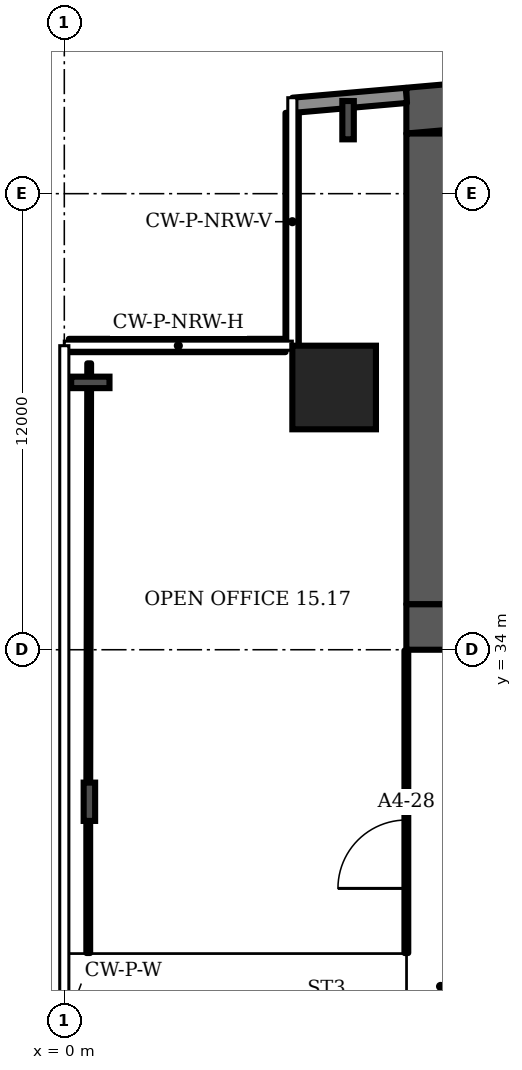
"""IFC4 building model, lengths in metres.
Left out: names, types, materials, properties, quantities, classifications, styles, units other than length and angle.
Written with IfcOpenShell. Run it as: python <this file> out.ifc"""

import sys

from ifc_helpers import new_model, si_unit, direction, frame, frame_2d, origin, origin_2d, place, context, subcontext, project, spatial, polyline, rectangle, i_section, outline, extrude, element, fill, save


model = new_model("IFC4")
c1 = context("Model", 3, precision=1e-05, world=origin(), true_north=direction((0.0, 1.0)))
c2 = subcontext(c1, "Body", "Model", "MODEL_VIEW")
j1 = project(units=[si_unit("LENGTHUNIT", "METRE"), si_unit("PLANEANGLEUNIT", "RADIAN")], contexts=[c1])
p1 = place(None, origin())
s1 = spatial("IfcSite", under=j1, at=p1, CompositionType="ELEMENT")
p2 = place(p1, origin())
s2 = spatial("IfcBuilding", under=s1, at=p2, CompositionType="ELEMENT")
p3 = place(p2, frame((0.0, 0.0, 73.9)))
s3 = spatial("IfcBuildingStorey", under=s2, at=p3, CompositionType="ELEMENT", Elevation=73.9)
p4 = place(p3, origin())
e1 = element("IfcWall", 1, at=p4, inside=s3, PredefinedType="SHEAR", context=c2, shape_type="SweptSolid", body=[
    extrude(outline(polyline([(9.0, 47.583), (37.0, 50.032), (65.0, 47.583), (65.0, 48.787), (37.0, 51.237), (9.0, 48.787), (9.0, 47.583)])), origin(), (0.0, 0.0, 1.0), 3.6),
])
p5 = place(p3, frame((9.0, 34.6, 0.0), z_axis=(0.0, 0.0, 1.0), x_axis=(1.0, 0.0, 0.0)))
e2 = element("IfcWall", 2, at=p5, inside=s3, PredefinedType="SHEAR", context=c2, shape_type="SweptSolid", body=[
    extrude(rectangle(XDim=56.0, YDim=1.2, at=frame_2d((28.0, 0.0))), origin(), (0.0, 0.0, 1.0), 3.6),
])
p6 = place(p5, frame((2.0, 0.0, 0.0)))
e3 = element("IfcOpeningElement", 3, at=p6, cuts=e2, PredefinedType="OPENING", context=c2, shape_type="SweptSolid", body=[
    extrude(rectangle(XDim=1.0, YDim=2.1, at=frame_2d((0.5, 1.05))), frame((0.0, 0.61, 0.0), z_axis=(0.0, -1.0, 0.0), x_axis=(1.0, 0.0, 0.0)), (0.0, 0.0, 1.0), 1.22),
])
p7 = place(p5, frame((4.6, 0.0, 0.0)))
e4 = element("IfcOpeningElement", 4, at=p7, cuts=e2, PredefinedType="OPENING", context=c2, shape_type="SweptSolid", body=[
    extrude(rectangle(XDim=1.0, YDim=2.1, at=frame_2d((0.5, 1.05))), frame((0.0, 0.61, 0.0), z_axis=(0.0, -1.0, 0.0), x_axis=(1.0, 0.0, 0.0)), (0.0, 0.0, 1.0), 1.22),
])
p8 = place(p5, frame((7.867, 0.0, 0.0)))
e5 = element("IfcOpeningElement", 5, at=p8, cuts=e2, PredefinedType="OPENING", context=c2, shape_type="SweptSolid", body=[
    extrude(rectangle(XDim=1.1, YDim=2.1, at=frame_2d((0.55, 1.05))), frame((0.0, 0.61, 0.0), z_axis=(0.0, -1.0, 0.0), x_axis=(1.0, 0.0, 0.0)), (0.0, 0.0, 1.0), 1.22),
])
p9 = place(p5, frame((12.033, 0.0, 0.0)))
e6 = element("IfcOpeningElement", 6, at=p9, cuts=e2, PredefinedType="OPENING", context=c2, shape_type="SweptSolid", body=[
    extrude(rectangle(XDim=1.1, YDim=2.1, at=frame_2d((0.55, 1.05))), frame((0.0, 0.61, 0.0), z_axis=(0.0, -1.0, 0.0), x_axis=(1.0, 0.0, 0.0)), (0.0, 0.0, 1.0), 1.22),
])
p10 = place(p5, frame((9.8, 0.0, 0.0)))
e7 = element("IfcOpeningElement", 7, at=p10, cuts=e2, PredefinedType="OPENING", context=c2, shape_type="SweptSolid", body=[
    extrude(rectangle(XDim=1.4, YDim=2.1, at=frame_2d((0.7, 1.05))), frame((0.0, 0.61, 0.0), z_axis=(0.0, -1.0, 0.0), x_axis=(1.0, 0.0, 0.0)), (0.0, 0.0, 1.0), 1.22),
])
p11 = place(p5, frame((14.65, 0.0, 0.0)))
e8 = element("IfcOpeningElement", 8, at=p11, cuts=e2, PredefinedType="OPENING", context=c2, shape_type="SweptSolid", body=[
    extrude(rectangle(XDim=1.2, YDim=2.1, at=frame_2d((0.6, 1.05))), frame((0.0, 0.61, 0.0), z_axis=(0.0, -1.0, 0.0), x_axis=(1.0, 0.0, 0.0)), (0.0, 0.0, 1.0), 1.22),
])
p12 = place(p5, frame((21.867, 0.0, 0.0)))
e9 = element("IfcOpeningElement", 9, at=p12, cuts=e2, PredefinedType="OPENING", context=c2, shape_type="SweptSolid", body=[
    extrude(rectangle(XDim=1.1, YDim=2.1, at=frame_2d((0.55, 1.05))), frame((0.0, 0.61, 0.0), z_axis=(0.0, -1.0, 0.0), x_axis=(1.0, 0.0, 0.0)), (0.0, 0.0, 1.0), 1.22),
])
p13 = place(p5, frame((26.033, 0.0, 0.0)))
e10 = element("IfcOpeningElement", 10, at=p13, cuts=e2, PredefinedType="OPENING", context=c2, shape_type="SweptSolid", body=[
    extrude(rectangle(XDim=1.1, YDim=2.1, at=frame_2d((0.55, 1.05))), frame((0.0, 0.61, 0.0), z_axis=(0.0, -1.0, 0.0), x_axis=(1.0, 0.0, 0.0)), (0.0, 0.0, 1.0), 1.22),
])
p14 = place(p5, frame((23.8, 0.0, 0.0)))
e11 = element("IfcOpeningElement", 11, at=p14, cuts=e2, PredefinedType="OPENING", context=c2, shape_type="SweptSolid", body=[
    extrude(rectangle(XDim=1.4, YDim=2.1, at=frame_2d((0.7, 1.05))), frame((0.0, 0.61, 0.0), z_axis=(0.0, -1.0, 0.0), x_axis=(1.0, 0.0, 0.0)), (0.0, 0.0, 1.0), 1.22),
])
p15 = place(p5, frame((28.867, 0.0, 0.0)))
e12 = element("IfcOpeningElement", 12, at=p15, cuts=e2, PredefinedType="OPENING", context=c2, shape_type="SweptSolid", body=[
    extrude(rectangle(XDim=1.1, YDim=2.1, at=frame_2d((0.55, 1.05))), frame((0.0, 0.61, 0.0), z_axis=(0.0, -1.0, 0.0), x_axis=(1.0, 0.0, 0.0)), (0.0, 0.0, 1.0), 1.22),
])
p16 = place(p5, frame((33.033, 0.0, 0.0)))
e13 = element("IfcOpeningElement", 13, at=p16, cuts=e2, PredefinedType="OPENING", context=c2, shape_type="SweptSolid", body=[
    extrude(rectangle(XDim=1.1, YDim=2.1, at=frame_2d((0.55, 1.05))), frame((0.0, 0.61, 0.0), z_axis=(0.0, -1.0, 0.0), x_axis=(1.0, 0.0, 0.0)), (0.0, 0.0, 1.0), 1.22),
])
p17 = place(p5, frame((40.15, 0.0, 0.0)))
e14 = element("IfcOpeningElement", 14, at=p17, cuts=e2, PredefinedType="OPENING", context=c2, shape_type="SweptSolid", body=[
    extrude(rectangle(XDim=1.2, YDim=2.1, at=frame_2d((0.6, 1.05))), frame((0.0, 0.61, 0.0), z_axis=(0.0, -1.0, 0.0), x_axis=(1.0, 0.0, 0.0)), (0.0, 0.0, 1.0), 1.22),
])
p18 = place(p5, frame((44.8, 0.0, 0.0)))
e15 = element("IfcOpeningElement", 15, at=p18, cuts=e2, PredefinedType="OPENING", context=c2, shape_type="SweptSolid", body=[
    extrude(rectangle(XDim=1.4, YDim=2.1, at=frame_2d((0.7, 1.05))), frame((0.0, 0.61, 0.0), z_axis=(0.0, -1.0, 0.0), x_axis=(1.0, 0.0, 0.0)), (0.0, 0.0, 1.0), 1.22),
])
p19 = place(p5, frame((49.867, 0.0, 0.0)))
e16 = element("IfcOpeningElement", 16, at=p19, cuts=e2, PredefinedType="OPENING", context=c2, shape_type="SweptSolid", body=[
    extrude(rectangle(XDim=1.1, YDim=2.1, at=frame_2d((0.55, 1.05))), frame((0.0, 0.61, 0.0), z_axis=(0.0, -1.0, 0.0), x_axis=(1.0, 0.0, 0.0)), (0.0, 0.0, 1.0), 1.22),
])
p20 = place(p5, frame((53.5, 0.0, 0.0)))
e17 = element("IfcOpeningElement", 17, at=p20, cuts=e2, PredefinedType="OPENING", context=c2, shape_type="SweptSolid", body=[
    extrude(rectangle(XDim=1.1, YDim=2.1, at=frame_2d((0.55, 1.05))), frame((0.0, 0.61, 0.0), z_axis=(0.0, -1.0, 0.0), x_axis=(1.0, 0.0, 0.0)), (0.0, 0.0, 1.0), 1.22),
])
p21 = place(p5, frame((51.567, 0.0, 0.0)))
e18 = element("IfcOpeningElement", 18, at=p21, cuts=e2, PredefinedType="OPENING", context=c2, shape_type="SweptSolid", body=[
    extrude(rectangle(XDim=1.4, YDim=2.1, at=frame_2d((0.7, 1.05))), frame((0.0, 0.61, 0.0), z_axis=(0.0, -1.0, 0.0), x_axis=(1.0, 0.0, 0.0)), (0.0, 0.0, 1.0), 1.22),
])
p22 = place(p3, frame((9.6, 35.2, 0.0), z_axis=(0.0, 0.0, 1.0), x_axis=(0.0, 1.0, 0.0)))
e19 = element("IfcWall", 19, at=p22, inside=s3, PredefinedType="SHEAR", context=c2, shape_type="SweptSolid", body=[
    extrude(rectangle(XDim=12.383, YDim=1.2, at=frame_2d((6.191, 0.0))), origin(), (0.0, 0.0, 1.0), 3.6),
])
p23 = place(p3, frame((7.1, 40.9, 0.0), z_axis=(0.0, 0.0, 1.0), x_axis=(1.0, 0.0, 0.0)))
e20 = element("IfcColumn", 20, at=p23, inside=s3, PredefinedType="COLUMN", context=c2, shape_type="SweptSolid", body=[
    extrude(rectangle(XDim=2.2, YDim=2.2, at=origin_2d()), origin(), (0.0, 0.0, 1.0), 3.6),
])
for number, where, z_axis, x_axis in (
    (21, (7.467, 47.934, 0.0), (0.0, 0.0, 1.0), (-1.0, 0.0, 0.0)),
    (22, (0.685, 41.034, 0.0), (0.0, 0.0, 1.0), (0.0, 1.0, 0.0)),
    (23, (0.66, 30.0, 0.0), (0.0, 0.0, 1.0), (-1.0, 0.0, 0.0)),
):
    element("IfcColumn", number, at=place(p3, frame(where, z_axis=z_axis, x_axis=x_axis)), inside=s3, PredefinedType="COLUMN", context=c2, shape_type="SweptSolid", body=[
        extrude(i_section(OverallWidth=0.302, OverallDepth=1.008, WebThickness=0.021, FlangeThickness=0.04, FilletRadius=0.03, at=origin_2d()), origin(), (0.0, 0.0, 1.0), 3.6),
    ])
p24 = place(p3, frame((9.0, 48.587, 0.0), z_axis=(0.0, 0.0, 1.0), x_axis=(-0.996194, -0.087168, 0.0)))
e24 = element("IfcWall", 24, at=p24, inside=s3, PredefinedType="SOLIDWALL", context=c2, shape_type="SweptSolid", body=[
    extrude(rectangle(XDim=2.994, YDim=0.4, at=frame_2d((1.497, 0.0))), origin(), (0.0, 0.0, 1.0), 3.2),
])
p25 = place(p3, frame((5.995, 48.126, 0.0), z_axis=(0.0, 0.0, 1.0), x_axis=(0.0, -1.0, 0.0)))
e25 = element("IfcWall", 25, at=p25, inside=s3, PredefinedType="SOLIDWALL", context=c2, shape_type="SweptSolid", body=[
    extrude(rectangle(XDim=6.126, YDim=0.35, at=frame_2d((3.063, 0.0))), origin(), (0.0, 0.0, 1.0), 1.0),
])
p26 = place(p3, frame((5.82, 42.005, 0.0), z_axis=(0.0, 0.0, 1.0), x_axis=(-1.0, 0.0, 0.0)))
e26 = element("IfcWall", 26, at=p26, inside=s3, PredefinedType="SOLIDWALL", context=c2, shape_type="SweptSolid", body=[
    extrude(rectangle(XDim=5.7, YDim=0.35, at=frame_2d((2.85, 0.0))), origin(), (0.0, 0.0, 1.0), 1.0),
])
p27 = place(p3, frame((0.63, 26.02, 0.0), z_axis=(0.0, 0.0, 1.0), x_axis=(0.0, 1.0, 0.0)))
e27 = element("IfcWall", 27, at=p27, inside=s3, PredefinedType="PARTITIONING", context=c2, shape_type="SweptSolid", body=[
    extrude(rectangle(XDim=3.98, YDim=0.1, at=frame_2d((1.99, 0.0))), origin(), (0.0, 0.0, 1.0), 2.58),
])
p28 = place(p3, frame((0.63, 30.0, 0.0), z_axis=(0.0, 0.0, 1.0), x_axis=(0.00218, 0.999994, 0.0)))
e28 = element("IfcWall", 28, at=p28, inside=s3, PredefinedType="PARTITIONING", context=c2, shape_type="SweptSolid", body=[
    extrude(rectangle(XDim=11.535, YDim=0.1, at=frame_2d((5.768, 0.0))), origin(), (0.0, 0.0, 1.0), 2.58),
])
p29 = place(p3, frame((9.0, 26.02, 0.0), z_axis=(0.0, 0.0, 1.0), x_axis=(0.0, 1.0, 0.0)))
e29 = element("IfcWall", 29, at=p29, inside=s3, PredefinedType="PARTITIONING", context=c2, shape_type="SweptSolid", body=[
    extrude(rectangle(XDim=7.96, YDim=0.1, at=frame_2d((3.98, 0.0))), origin(), (0.0, 0.0, 1.0), 3.2),
])
p30 = place(p29, frame((1.7, 0.0, 0.0)))
e30 = element("IfcOpeningElement", 30, at=p30, cuts=e29, PredefinedType="OPENING", context=c2, shape_type="SweptSolid", body=[
    extrude(rectangle(XDim=1.8, YDim=2.1, at=frame_2d((0.9, 1.05))), frame((0.0, 0.06, 0.0), z_axis=(0.0, -1.0, 0.0), x_axis=(1.0, 0.0, 0.0)), (0.0, 0.0, 1.0), 0.12),
])
p31 = place(p30, origin())
e31 = element("IfcDoor", 31, at=p31, inside=s3, OperationType="DOUBLE_DOOR_SINGLE_SWING", PredefinedType="DOOR", context=c2, shape_type="SweptSolid", body=[
    extrude(rectangle(XDim=1.8, YDim=2.1, at=frame_2d((0.9, 1.05))), frame((0.0, 0.025, 0.0), z_axis=(0.0, -1.0, 0.0), x_axis=(1.0, 0.0, 0.0)), (0.0, 0.0, 1.0), 0.05),
])
fill(e30, e31)
save(model, sys.argv[1])
